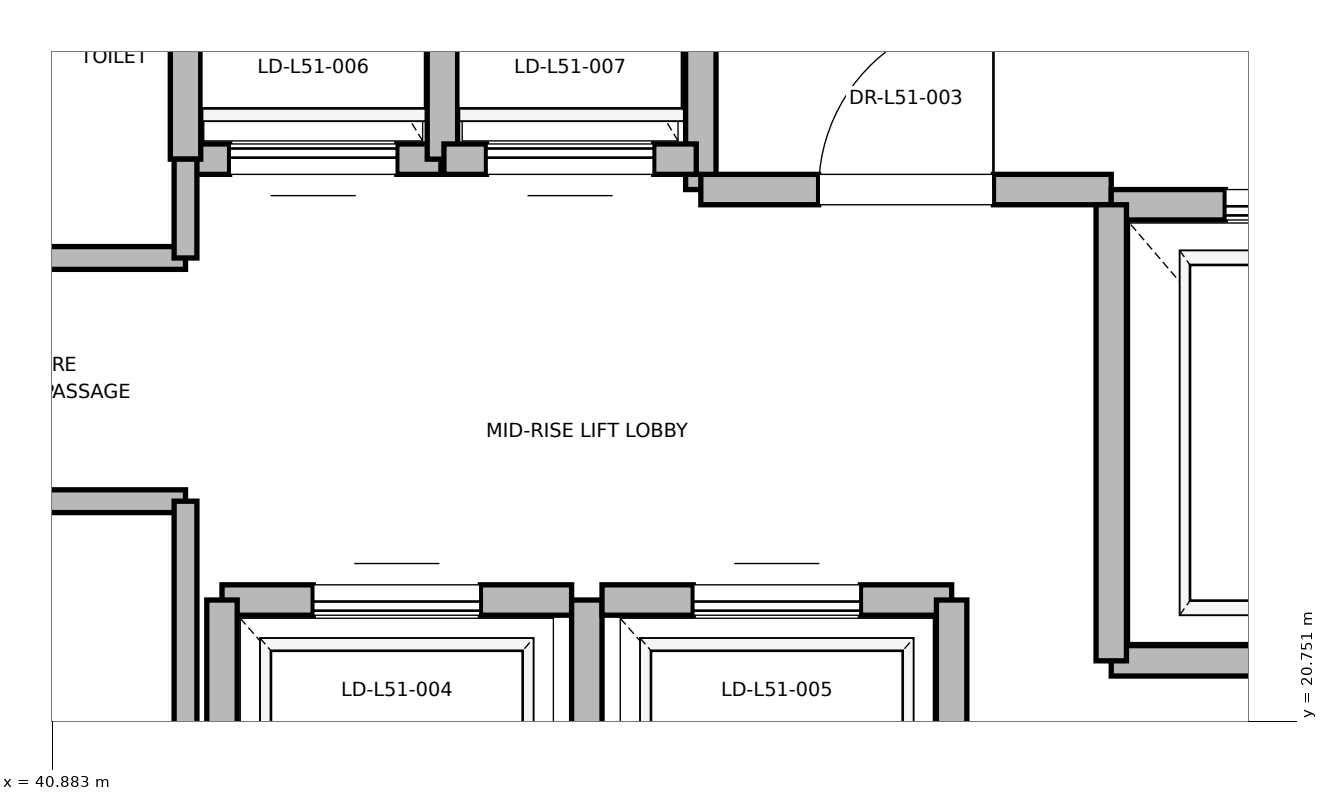
"""IFC4 building model, lengths in metres.
Left out: names, types, materials, properties, quantities, classifications, styles, units other than length and angle.
Written with IfcOpenShell. Run it as: python <this file> out.ifc"""

import sys

from ifc_helpers import new_model, si_unit, direction, frame, frame_2d, origin, place, context, subcontext, project, spatial, rectangle, extrude, element, fill, save


model = new_model("IFC4")
c1 = context("Model", 3, precision=1e-05, world=origin(), true_north=direction((0.0, 1.0)))
c2 = subcontext(c1, "Body", "Model", "MODEL_VIEW")
j1 = project(units=[si_unit("LENGTHUNIT", "METRE"), si_unit("PLANEANGLEUNIT", "RADIAN")], contexts=[c1])
p1 = place(None, origin())
s1 = spatial("IfcSite", under=j1, at=p1, CompositionType="ELEMENT")
p2 = place(p1, origin())
s2 = spatial("IfcBuilding", under=s1, at=p2, CompositionType="ELEMENT")
p3 = place(p2, frame((0.0, 0.0, 221.2)))
s3 = spatial("IfcBuildingStorey", under=s2, at=p3, CompositionType="ELEMENT", Elevation=221.2)
p4 = place(p3, frame((45.15, 24.25, 0.0), z_axis=(0.0, 0.0, 1.0), x_axis=(0.0, 1.0, 0.0)))
e1 = element("IfcWall", 1, at=p4, inside=s3, PredefinedType="PARTITIONING", context=c2, shape_type="SweptSolid", body=[
    extrude(rectangle(XDim=3.37, YDim=0.2, at=frame_2d((1.685, 0.0))), origin(), (0.0, 0.0, 1.0), 3.775),
])
p5 = place(p3, frame((45.15, 24.25, 0.0), z_axis=(0.0, 0.0, 1.0), x_axis=(1.0, 0.0, 0.0)))
e2 = element("IfcWall", 2, at=p5, inside=s3, PredefinedType="PARTITIONING", context=c2, shape_type="SweptSolid", body=[
    extrude(rectangle(XDim=2.7, YDim=0.2, at=frame_2d((1.35, 0.0))), origin(), (0.0, 0.0, 1.0), 3.775),
])
p6 = place(p5, frame((0.775, 0.0, 0.0)))
e3 = element("IfcOpeningElement", 3, at=p6, cuts=e2, PredefinedType="OPENING", context=c2, shape_type="SweptSolid", body=[
    extrude(rectangle(XDim=1.15, YDim=2.2, at=frame_2d((0.575, 1.1))), frame((0.0, 0.1, 0.0), z_axis=(0.0, -1.0, 0.0), x_axis=(1.0, 0.0, 0.0)), (0.0, 0.0, 1.0), 0.2),
])
p7 = place(p3, frame((47.85, 21.15, 0.0), z_axis=(0.0, 0.0, 1.0), x_axis=(1.0, 0.0, 0.0)))
e4 = element("IfcWall", 4, at=p7, inside=s3, PredefinedType="SOLIDWALL", context=c2, shape_type="SweptSolid", body=[
    extrude(rectangle(XDim=2.6, YDim=0.2, at=frame_2d((1.3, 0.0))), origin(), (0.0, 0.0, 1.0), 3.775),
])
p8 = place(p3, frame((50.45, 24.15, 0.0), z_axis=(0.0, 0.0, 1.0), x_axis=(-1.0, 0.0, 0.0)))
e5 = element("IfcWall", 5, at=p8, inside=s3, PredefinedType="SOLIDWALL", context=c2, shape_type="SweptSolid", body=[
    extrude(rectangle(XDim=2.6, YDim=0.2, at=frame_2d((1.3, 0.0))), origin(), (0.0, 0.0, 1.0), 2.755),
])
p9 = place(p8, frame((0.75, 0.0, 0.0)))
e6 = element("IfcOpeningElement", 6, at=p9, cuts=e5, PredefinedType="OPENING", context=c2, shape_type="SweptSolid", body=[
    extrude(rectangle(XDim=1.1, YDim=2.2, at=frame_2d((0.55, 1.1))), frame((0.0, 0.1, 0.0), z_axis=(0.0, -1.0, 0.0), x_axis=(1.0, 0.0, 0.0)), (0.0, 0.0, 1.0), 0.2),
])
p10 = place(p3, frame((47.85, 24.15, 0.0), z_axis=(0.0, 0.0, 1.0), x_axis=(0.0, -1.0, 0.0)))
e7 = element("IfcWall", 7, at=p10, inside=s3, PredefinedType="SOLIDWALL", context=c2, shape_type="SweptSolid", body=[
    extrude(rectangle(XDim=3.0, YDim=0.2, at=frame_2d((1.5, 0.0))), origin(), (0.0, 0.0, 1.0), 3.775),
])
p11 = place(p3, frame((44.3, 21.55, 0.0), z_axis=(0.0, 0.0, 1.0), x_axis=(-1.0, 0.0, 0.0)))
e8 = element("IfcWall", 8, at=p11, inside=s3, PredefinedType="SOLIDWALL", context=c2, shape_type="SweptSolid", body=[
    extrude(rectangle(XDim=2.3, YDim=0.2, at=frame_2d((1.15, 0.0))), origin(), (0.0, 0.0, 1.0), 3.775),
])
p12 = place(p11, frame((0.6, 0.0, 0.0)))
e9 = element("IfcOpeningElement", 9, at=p12, cuts=e8, PredefinedType="OPENING", context=c2, shape_type="SweptSolid", body=[
    extrude(rectangle(XDim=1.1, YDim=2.2, at=frame_2d((0.55, 1.1))), frame((0.0, 0.1, 0.0), z_axis=(0.0, -1.0, 0.0), x_axis=(1.0, 0.0, 0.0)), (0.0, 0.0, 1.0), 0.2),
])
p13 = place(p3, frame((42.0, 21.55, 0.0), z_axis=(0.0, 0.0, 1.0), x_axis=(0.0, -1.0, 0.0)))
e10 = element("IfcWall", 10, at=p13, inside=s3, PredefinedType="SOLIDWALL", context=c2, shape_type="SweptSolid", body=[
    extrude(rectangle(XDim=2.6, YDim=0.2, at=frame_2d((1.3, 0.0))), origin(), (0.0, 0.0, 1.0), 2.755),
])
p14 = place(p3, frame((44.4, 18.95, 0.0), z_axis=(0.0, 0.0, 1.0), x_axis=(0.0, 1.0, 0.0)))
e11 = element("IfcWall", 11, at=p14, inside=s3, PredefinedType="SOLIDWALL", context=c2, shape_type="SweptSolid", body=[
    extrude(rectangle(XDim=2.6, YDim=0.2, at=frame_2d((1.3, 0.0))), origin(), (0.0, 0.0, 1.0), 3.775),
])
p15 = place(p3, frame((46.8, 21.55, 0.0), z_axis=(0.0, 0.0, 1.0), x_axis=(-1.0, 0.0, 0.0)))
e12 = element("IfcWall", 12, at=p15, inside=s3, PredefinedType="SOLIDWALL", context=c2, shape_type="SweptSolid", body=[
    extrude(rectangle(XDim=2.3, YDim=0.2, at=frame_2d((1.15, 0.0))), origin(), (0.0, 0.0, 1.0), 3.775),
])
p16 = place(p15, frame((0.6, 0.0, 0.0)))
e13 = element("IfcOpeningElement", 13, at=p16, cuts=e12, PredefinedType="OPENING", context=c2, shape_type="SweptSolid", body=[
    extrude(rectangle(XDim=1.1, YDim=2.2, at=frame_2d((0.55, 1.1))), frame((0.0, 0.1, 0.0), z_axis=(0.0, -1.0, 0.0), x_axis=(1.0, 0.0, 0.0)), (0.0, 0.0, 1.0), 0.2),
])
p17 = place(p3, frame((46.8, 18.95, 0.0), z_axis=(0.0, 0.0, 1.0), x_axis=(0.0, 1.0, 0.0)))
e14 = element("IfcWall", 14, at=p17, inside=s3, PredefinedType="SOLIDWALL", context=c2, shape_type="SweptSolid", body=[
    extrude(rectangle(XDim=2.6, YDim=0.2, at=frame_2d((1.3, 0.0))), origin(), (0.0, 0.0, 1.0), 3.775),
])
p18 = place(p3, frame((41.76, 24.45, 0.0), z_axis=(0.0, 0.0, 1.0), x_axis=(1.0, 0.0, 0.0)))
e15 = element("IfcWall", 15, at=p18, inside=s3, PredefinedType="SOLIDWALL", context=c2, shape_type="SweptSolid", body=[
    extrude(rectangle(XDim=1.68, YDim=0.2, at=frame_2d((0.84, 0.0))), origin(), (0.0, 0.0, 1.0), 3.775),
])
p19 = place(p18, frame((0.29, 0.0, 0.0)))
e16 = element("IfcOpeningElement", 16, at=p19, cuts=e15, PredefinedType="OPENING", context=c2, shape_type="SweptSolid", body=[
    extrude(rectangle(XDim=1.1, YDim=2.2, at=frame_2d((0.55, 1.1))), frame((0.0, 0.1, 0.0), z_axis=(0.0, -1.0, 0.0), x_axis=(1.0, 0.0, 0.0)), (0.0, 0.0, 1.0), 0.2),
])
for number, where, z_axis, x_axis in (
    (17, (41.76, 27.05, 0.0), (0.0, 0.0, 1.0), (0.0, -1.0, 0.0)),
    (18, (43.45, 24.45, 0.0), (0.0, 0.0, 1.0), (0.0, 1.0, 0.0)),
):
    element("IfcWall", number, at=place(p3, frame(where, z_axis=z_axis, x_axis=x_axis)), inside=s3, PredefinedType="SOLIDWALL", context=c2, shape_type="SweptSolid", body=[
        extrude(rectangle(XDim=2.6, YDim=0.2, at=frame_2d((1.3, 0.0))), origin(), (0.0, 0.0, 1.0), 3.775),
    ])
p20 = place(p3, frame((43.46, 24.45, 0.0), z_axis=(0.0, 0.0, 1.0), x_axis=(1.0, 0.0, 0.0)))
e19 = element("IfcWall", 19, at=p20, inside=s3, PredefinedType="SOLIDWALL", context=c2, shape_type="SweptSolid", body=[
    extrude(rectangle(XDim=1.66, YDim=0.2, at=frame_2d((0.83, 0.0))), origin(), (0.0, 0.0, 1.0), 3.775),
])
p21 = place(p20, frame((0.28, 0.0, 0.0)))
e20 = element("IfcOpeningElement", 20, at=p21, cuts=e19, PredefinedType="OPENING", context=c2, shape_type="SweptSolid", body=[
    extrude(rectangle(XDim=1.1, YDim=2.2, at=frame_2d((0.55, 1.1))), frame((0.0, 0.1, 0.0), z_axis=(0.0, -1.0, 0.0), x_axis=(1.0, 0.0, 0.0)), (0.0, 0.0, 1.0), 0.2),
])
for number, where, z_axis, x_axis in (
    (21, (39.95, 22.2, 0.0), (0.0, 0.0, 1.0), (1.0, 0.0, 0.0)),
    (22, (39.95, 23.8, 0.0), (0.0, 0.0, 1.0), (1.0, 0.0, 0.0)),
):
    element("IfcWall", number, at=place(p3, frame(where, z_axis=z_axis, x_axis=x_axis)), inside=s3, PredefinedType="PARTITIONING", context=c2, shape_type="SweptSolid", body=[
        extrude(rectangle(XDim=1.81, YDim=0.15, at=frame_2d((0.905, 0.0))), origin(), (0.0, 0.0, 1.0), 2.85),
    ])
p22 = place(p3, frame((41.76, 18.6, 0.0), z_axis=(0.0, 0.0, 1.0), x_axis=(0.0, 1.0, 0.0)))
e23 = element("IfcWall", 23, at=p22, inside=s3, PredefinedType="PARTITIONING", context=c2, shape_type="SweptSolid", body=[
    extrude(rectangle(XDim=3.6, YDim=0.15, at=frame_2d((1.8, 0.0))), origin(), (0.0, 0.0, 1.0), 2.755),
])
p23 = place(p3, frame((41.76, 23.8, 0.0), z_axis=(0.0, 0.0, 1.0), x_axis=(0.0, 1.0, 0.0)))
e24 = element("IfcWall", 24, at=p23, inside=s3, PredefinedType="PARTITIONING", context=c2, shape_type="SweptSolid", body=[
    extrude(rectangle(XDim=0.65, YDim=0.15, at=frame_2d((0.325, 0.0))), origin(), (0.0, 0.0, 1.0), 2.85),
])
p24 = place(p6, origin())
e25 = element("IfcDoor", 25, at=p24, inside=s3, OperationType="SINGLE_SWING_RIGHT", PredefinedType="DOOR", context=c2, shape_type="SweptSolid", body=[
    extrude(rectangle(XDim=1.15, YDim=2.2, at=frame_2d((0.575, 1.1))), frame((0.0, 0.025, 0.0), z_axis=(0.0, -1.0, 0.0), x_axis=(1.0, 0.0, 0.0)), (0.0, 0.0, 1.0), 0.05),
])
fill(e3, e25)
p25 = place(p9, origin())
e26 = element("IfcDoor", 26, at=p25, inside=s3, OperationType="SLIDING_TO_RIGHT", PredefinedType="DOOR", context=c2, shape_type="SweptSolid", body=[
    extrude(rectangle(XDim=1.1, YDim=2.2, at=frame_2d((0.55, 1.1))), frame((0.0, 0.025, 0.0), z_axis=(0.0, -1.0, 0.0), x_axis=(1.0, 0.0, 0.0)), (0.0, 0.0, 1.0), 0.05),
])
fill(e6, e26)
p26 = place(p12, origin())
e27 = element("IfcDoor", 27, at=p26, inside=s3, OperationType="SLIDING_TO_RIGHT", PredefinedType="DOOR", context=c2, shape_type="SweptSolid", body=[
    extrude(rectangle(XDim=1.1, YDim=2.2, at=frame_2d((0.55, 1.1))), frame((0.0, 0.025, 0.0), z_axis=(0.0, -1.0, 0.0), x_axis=(1.0, 0.0, 0.0)), (0.0, 0.0, 1.0), 0.05),
])
fill(e9, e27)
p27 = place(p16, origin())
e28 = element("IfcDoor", 28, at=p27, inside=s3, OperationType="SLIDING_TO_RIGHT", PredefinedType="DOOR", context=c2, shape_type="SweptSolid", body=[
    extrude(rectangle(XDim=1.1, YDim=2.2, at=frame_2d((0.55, 1.1))), frame((0.0, 0.025, 0.0), z_axis=(0.0, -1.0, 0.0), x_axis=(1.0, 0.0, 0.0)), (0.0, 0.0, 1.0), 0.05),
])
fill(e13, e28)
p28 = place(p19, origin())
e29 = element("IfcDoor", 29, at=p28, inside=s3, OperationType="SLIDING_TO_RIGHT", PredefinedType="DOOR", context=c2, shape_type="SweptSolid", body=[
    extrude(rectangle(XDim=1.1, YDim=2.2, at=frame_2d((0.55, 1.1))), frame((0.0, 0.025, 0.0), z_axis=(0.0, -1.0, 0.0), x_axis=(1.0, 0.0, 0.0)), (0.0, 0.0, 1.0), 0.05),
])
fill(e16, e29)
p29 = place(p21, origin())
e30 = element("IfcDoor", 30, at=p29, inside=s3, OperationType="SLIDING_TO_RIGHT", PredefinedType="DOOR", context=c2, shape_type="SweptSolid", body=[
    extrude(rectangle(XDim=1.1, YDim=2.2, at=frame_2d((0.55, 1.1))), frame((0.0, 0.025, 0.0), z_axis=(0.0, -1.0, 0.0), x_axis=(1.0, 0.0, 0.0)), (0.0, 0.0, 1.0), 0.05),
])
fill(e20, e30)
save(model, sys.argv[1])
